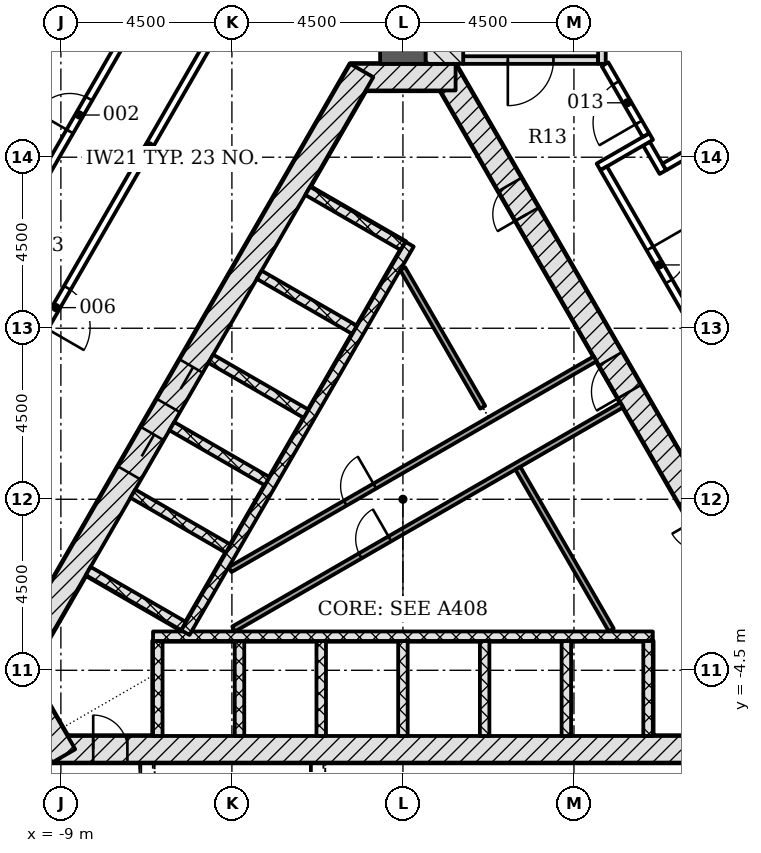
"""IFC4 building model, lengths in metres.
Left out: names, types, materials, properties, quantities, classifications, styles, units other than length and angle.
Written with IfcOpenShell. Run it as: python <this file> out.ifc"""

import sys

from ifc_helpers import new_model, si_unit, direction, frame, frame_2d, origin, place, context, subcontext, project, spatial, rectangle, extrude, element, fill, save


model = new_model("IFC4")
c1 = context("Model", 3, precision=1e-05, world=origin(), true_north=direction((0.0, 1.0)))
c2 = subcontext(c1, "Body", "Model", "MODEL_VIEW")
j1 = project(units=[si_unit("LENGTHUNIT", "METRE"), si_unit("PLANEANGLEUNIT", "RADIAN")], contexts=[c1])
p1 = place(None, origin())
s1 = spatial("IfcSite", under=j1, at=p1, CompositionType="ELEMENT")
p2 = place(p1, origin())
s2 = spatial("IfcBuilding", under=s1, at=p2, CompositionType="ELEMENT")
p3 = place(p2, frame((0.0, 0.0, 52.8)))
s3 = spatial("IfcBuildingStorey", under=s2, at=p3, CompositionType="ELEMENT", Elevation=52.8)
p4 = place(p3, frame((-9.229, -6.578, -0.3), z_axis=(0.0, 0.0, 1.0), x_axis=(1.0, 0.0, 0.0)))
e1 = element("IfcWall", 1, at=p4, inside=s3, PredefinedType="SHEAR", context=c2, shape_type="SweptSolid", body=[
    extrude(rectangle(XDim=18.458, YDim=0.7, at=frame_2d((9.229, 0.0))), origin(), (0.0, 0.0, 1.0), 5.5),
])
p5 = place(p4, frame((1.079, 0.0, 0.3)))
e2 = element("IfcOpeningElement", 2, at=p5, cuts=e1, PredefinedType="OPENING", context=c2, shape_type="SweptSolid", body=[
    extrude(rectangle(XDim=0.9, YDim=2.1, at=frame_2d((0.45, 1.05))), frame((0.0, 0.36, 0.0), z_axis=(0.0, -1.0, 0.0), x_axis=(1.0, 0.0, 0.0)), (0.0, 0.0, 1.0), 0.72),
])
p6 = place(p3, frame((10.311, -4.703, -0.3), z_axis=(0.0, 0.0, 1.0), x_axis=(-0.500001446645, 0.866024568562, 0.0)))
e3 = element("IfcWall", 3, at=p6, inside=s3, PredefinedType="SHEAR", context=c2, shape_type="SweptSolid", body=[
    extrude(rectangle(XDim=18.458, YDim=0.7, at=frame_2d((9.229, 0.0))), origin(), (0.0, 0.0, 1.0), 5.5),
])
p7 = place(p6, frame((8.7, 0.0, 0.3)))
e4 = element("IfcOpeningElement", 4, at=p7, cuts=e3, PredefinedType="OPENING", context=c2, shape_type="SweptSolid", body=[
    extrude(rectangle(XDim=1.0, YDim=2.1, at=frame_2d((0.5, 1.05))), frame((0.0, 0.36, 0.0), z_axis=(0.0, -1.0, 0.0), x_axis=(1.0, 0.0, 0.0)), (0.0, 0.0, 1.0), 0.72),
])
p8 = place(p6, frame((4.002, 0.0, 0.3)))
e5 = element("IfcOpeningElement", 5, at=p8, cuts=e3, PredefinedType="OPENING", context=c2, shape_type="SweptSolid", body=[
    extrude(rectangle(XDim=0.9, YDim=2.1, at=frame_2d((0.45, 1.05))), frame((0.0, 0.36, 0.0), z_axis=(0.0, -1.0, 0.0), x_axis=(1.0, 0.0, 0.0)), (0.0, 0.0, 1.0), 0.72),
])
p9 = place(p6, frame((14.093, 0.0, 0.3)))
e6 = element("IfcOpeningElement", 6, at=p9, cuts=e3, PredefinedType="OPENING", context=c2, shape_type="SweptSolid", body=[
    extrude(rectangle(XDim=0.9, YDim=2.1, at=frame_2d((0.45, 1.05))), frame((0.0, 0.36, 0.0), z_axis=(0.0, -1.0, 0.0), x_axis=(1.0, 0.0, 0.0)), (0.0, 0.0, 1.0), 0.72),
])
p10 = place(p3, frame((1.386, 11.106, -0.3), z_axis=(0.0, 0.0, 1.0), x_axis=(-1.0, 0.0, 0.0)))
e7 = element("IfcWall", 7, at=p10, inside=s3, PredefinedType="SHEAR", context=c2, shape_type="SweptSolid", body=[
    extrude(rectangle(XDim=2.771, YDim=0.7, at=frame_2d((1.386, 0.0))), origin(), (0.0, 0.0, 1.0), 5.5),
])
p11 = place(p3, frame((-1.083, 11.281, -0.3), z_axis=(0.0, 0.0, 1.0), x_axis=(-0.500001446645, -0.866024568562, 0.0)))
e8 = element("IfcWall", 8, at=p11, inside=s3, PredefinedType="SHEAR", context=c2, shape_type="SweptSolid", body=[
    extrude(rectangle(XDim=18.458, YDim=0.7, at=frame_2d((9.229, 0.0))), origin(), (0.0, 0.0, 1.0), 5.5),
])
p12 = place(p11, frame((8.979, 0.0, 0.3)))
e9 = element("IfcOpeningElement", 9, at=p12, cuts=e8, PredefinedType="OPENING", context=c2, shape_type="SweptSolid", body=[
    extrude(rectangle(XDim=1.2, YDim=2.1, at=frame_2d((0.6, 1.05))), frame((0.0, 0.36, 0.0), z_axis=(0.0, -1.0, 0.0), x_axis=(1.0, 0.0, 0.0)), (0.0, 0.0, 1.0), 0.72),
])
p13 = place(p11, frame((11.029, 0.0, 0.3)))
e10 = element("IfcOpeningElement", 10, at=p13, cuts=e8, PredefinedType="OPENING", context=c2, shape_type="SweptSolid", body=[
    extrude(rectangle(XDim=1.2, YDim=2.1, at=frame_2d((0.6, 1.05))), frame((0.0, 0.36, 0.0), z_axis=(0.0, -1.0, 0.0), x_axis=(1.0, 0.0, 0.0)), (0.0, 0.0, 1.0), 0.72),
])
p14 = place(p3, frame((-10.311, -4.353, -0.3), z_axis=(0.0, 0.0, 1.0), x_axis=(0.500042739161, -0.866000726912, 0.0)))
e11 = element("IfcWall", 11, at=p14, inside=s3, PredefinedType="SHEAR", context=c2, shape_type="SweptSolid", body=[
    extrude(rectangle(XDim=2.771, YDim=0.7, at=frame_2d((1.386, 0.0))), origin(), (0.0, 0.0, 1.0), 5.5),
])
p15 = place(p3, frame((0.0, 11.456, -0.3), z_axis=(0.0, 0.0, 1.0), x_axis=(0.0, 1.0, 0.0)))
e12 = element("IfcWall", 12, at=p15, inside=s3, PredefinedType="SHEAR", context=c2, shape_type="SweptSolid", body=[
    extrude(rectangle(XDim=13.699, YDim=1.2, at=frame_2d((6.849, 0.0))), origin(), (0.0, 0.0, 1.0), 5.5),
])
for number, where, z_axis, x_axis in (
    (13, (-6.45, -6.228, -0.3), (0.0, 0.0, 1.0), (0.0, 1.0, 0.0)),
    (14, (-4.3, -6.228, -0.3), (0.0, 0.0, 1.0), (0.0, 1.0, 0.0)),
    (15, (-2.15, -6.228, -0.3), (0.0, 0.0, 1.0), (0.0, 1.0, 0.0)),
    (16, (0.0, -6.228, -0.3), (0.0, 0.0, 1.0), (0.0, 1.0, 0.0)),
    (17, (2.15, -6.228, -0.3), (0.0, 0.0, 1.0), (0.0, 1.0, 0.0)),
    (18, (4.3, -6.228, -0.3), (0.0, 0.0, 1.0), (0.0, 1.0, 0.0)),
    (19, (6.45, -6.228, -0.3), (0.0, 0.0, 1.0), (0.0, 1.0, 0.0)),
):
    element("IfcWall", number, at=place(p3, frame(where, z_axis=z_axis, x_axis=x_axis)), inside=s3, PredefinedType="PARTITIONING", context=c2, shape_type="SweptSolid", body=[
        extrude(rectangle(XDim=2.5, YDim=0.25, at=frame_2d((1.25, 0.0))), origin(), (0.0, 0.0, 1.0), 5.5),
    ])
p16 = place(p3, frame((-6.575, -3.603, 0.0), z_axis=(0.0, 0.0, 1.0), x_axis=(1.0, 0.0, 0.0)))
e20 = element("IfcWall", 20, at=p16, inside=s3, PredefinedType="PARTITIONING", context=c2, shape_type="SweptSolid", body=[
    extrude(rectangle(XDim=13.15, YDim=0.25, at=frame_2d((6.575, 0.0))), origin(), (0.0, 0.0, 1.0), 5.2),
])
p17 = place(p3, frame((-2.506, 8.115, -0.3), z_axis=(0.0, 0.0, 1.0), x_axis=(0.865996321171, -0.50005036918, 0.0)))
e21 = element("IfcWall", 21, at=p17, inside=s3, PredefinedType="PARTITIONING", context=c2, shape_type="SweptSolid", body=[
    extrude(rectangle(XDim=2.9, YDim=0.25, at=frame_2d((1.45, 0.0))), origin(), (0.0, 0.0, 1.0), 5.5),
])
for number, where, z_axis, x_axis in (
    (22, (-3.781, 5.907, -0.3), (0.0, 0.0, 1.0), (0.866, -0.5, 0.0)),
    (23, (-5.056, 3.699, -0.3), (0.0, 0.0, 1.0), (0.866, -0.5, 0.0)),
    (24, (-6.081, 1.923, -0.3), (0.0, 0.0, 1.0), (0.866, -0.5, 0.0)),
    (25, (-7.106, 0.148, -0.3), (0.0, 0.0, 1.0), (0.866, -0.5, 0.0)),
    (26, (-8.281, -1.887, -0.3), (0.0, 0.0, 1.0), (0.866, -0.5, 0.0)),
):
    element("IfcWall", number, at=place(p3, frame(where, z_axis=z_axis, x_axis=x_axis)), inside=s3, PredefinedType="PARTITIONING", context=c2, shape_type="SweptSolid", body=[
        extrude(rectangle(XDim=2.9, YDim=0.25, at=frame_2d((1.45, 0.0))), origin(), (0.0, 0.0, 1.0), 5.5),
    ])
p18 = place(p3, frame((0.176, 6.711, 0.0), z_axis=(0.0, 0.0, 1.0), x_axis=(-0.500004227369, -0.866022963098, 0.0)))
e27 = element("IfcWall", 27, at=p18, inside=s3, PredefinedType="PARTITIONING", context=c2, shape_type="SweptSolid", body=[
    extrude(rectangle(XDim=11.8, YDim=0.25, at=frame_2d((5.9, 0.0))), origin(), (0.0, 0.0, 1.0), 5.2),
])
p19 = place(p3, frame((-4.548, -1.851, 0.0), z_axis=(0.0, 0.0, 1.0), x_axis=(0.866023939251, 0.500002536638, 0.0)))
e28 = element("IfcWall", 28, at=p19, inside=s3, PredefinedType="PARTITIONING", context=c2, shape_type="SweptSolid", body=[
    extrude(rectangle(XDim=11.092, YDim=0.15, at=frame_2d((5.546, 0.0))), origin(), (0.0, 0.0, 1.0), 5.2),
])
p20 = place(p19, frame((3.497, 0.0, 0.0)))
e29 = element("IfcOpeningElement", 29, at=p20, cuts=e28, PredefinedType="OPENING", context=c2, shape_type="SweptSolid", body=[
    extrude(rectangle(XDim=0.9, YDim=2.1, at=frame_2d((0.45, 1.05))), frame((0.0, 0.085, 0.0), z_axis=(0.0, -1.0, 0.0), x_axis=(1.0, 0.0, 0.0)), (0.0, 0.0, 1.0), 0.17),
])
p21 = place(p3, frame((2.099, 2.42, 0.0), z_axis=(0.0, 0.0, 1.0), x_axis=(-0.499998449073, 0.866026299211, 0.0)))
e30 = element("IfcWall", 30, at=p21, inside=s3, PredefinedType="PARTITIONING", context=c2, shape_type="SweptSolid", body=[
    extrude(rectangle(XDim=4.211, YDim=0.15, at=frame_2d((2.106, 0.0))), origin(), (0.0, 0.0, 1.0), 5.2),
])
p22 = place(p3, frame((-4.454, -3.413, 0.0), z_axis=(0.0, 0.0, 1.0), x_axis=(0.86603043987, 0.499991277142, 0.0)))
e31 = element("IfcWall", 31, at=p22, inside=s3, PredefinedType="PARTITIONING", context=c2, shape_type="SweptSolid", body=[
    extrude(rectangle(XDim=11.792, YDim=0.15, at=frame_2d((5.896, 0.0))), origin(), (0.0, 0.0, 1.0), 5.2),
])
p23 = place(p22, frame((3.847, 0.0, 0.0)))
e32 = element("IfcOpeningElement", 32, at=p23, cuts=e31, PredefinedType="OPENING", context=c2, shape_type="SweptSolid", body=[
    extrude(rectangle(XDim=0.9, YDim=2.1, at=frame_2d((0.45, 1.05))), frame((0.0, 0.085, 0.0), z_axis=(0.0, -1.0, 0.0), x_axis=(1.0, 0.0, 0.0)), (0.0, 0.0, 1.0), 0.17),
])
p24 = place(p3, frame((5.482, -3.439, 0.0), z_axis=(0.0, 0.0, 1.0), x_axis=(-0.500006183238, 0.866021833861, 0.0)))
e33 = element("IfcWall", 33, at=p24, inside=s3, PredefinedType="PARTITIONING", context=c2, shape_type="SweptSolid", body=[
    extrude(rectangle(XDim=4.916, YDim=0.15, at=frame_2d((2.458, 0.0))), origin(), (0.0, 0.0, 1.0), 5.2),
])
p25 = place(p3, frame((5.135, 11.556, -0.3), z_axis=(0.0, 0.0, 1.0), x_axis=(-1.0, 0.0, 0.0)))
e34 = element("IfcWall", 34, at=p25, inside=s3, PredefinedType="SHEAR", context=c2, shape_type="SweptSolid", body=[
    extrude(rectangle(XDim=3.55, YDim=0.2, at=frame_2d((1.775, 0.0))), origin(), (0.0, 0.0, 1.0), 5.5),
])
p26 = place(p25, frame((1.175, 0.0, 0.3)))
e35 = element("IfcOpeningElement", 35, at=p26, cuts=e34, PredefinedType="OPENING", context=c2, shape_type="SweptSolid", body=[
    extrude(rectangle(XDim=1.2, YDim=2.1, at=frame_2d((0.6, 1.05))), frame((0.0, 0.11, 0.0), z_axis=(0.0, -1.0, 0.0), x_axis=(1.0, 0.0, 0.0)), (0.0, 0.0, 1.0), 0.22),
])
p27 = place(p3, frame((5.236, 11.456, -0.3), z_axis=(0.0, 0.0, 1.0), x_axis=(0.0, 1.0, 0.0)))
e36 = element("IfcWall", 36, at=p27, inside=s3, PredefinedType="SHEAR", context=c2, shape_type="SweptSolid", body=[
    extrude(rectangle(XDim=5.6, YDim=0.2, at=frame_2d((2.8, 0.0))), origin(), (0.0, 0.0, 1.0), 5.5),
])
p28 = place(p27, frame((0.45, 0.0, 0.3)))
e37 = element("IfcOpeningElement", 37, at=p28, cuts=e36, PredefinedType="OPENING", context=c2, shape_type="SweptSolid", body=[
    extrude(rectangle(XDim=1.2, YDim=2.1, at=frame_2d((0.6, 1.05))), frame((0.0, 0.11, 0.0), z_axis=(0.0, -1.0, 0.0), x_axis=(1.0, 0.0, 0.0)), (0.0, 0.0, 1.0), 0.22),
])
p29 = place(p3, frame((1.093, 11.456, -0.3), z_axis=(0.0, 0.0, 1.0), x_axis=(0.0, 1.0, 0.0)))
e38 = element("IfcWall", 38, at=p29, inside=s3, PredefinedType="SHEAR", context=c2, shape_type="SweptSolid", body=[
    extrude(rectangle(XDim=7.2, YDim=0.986, at=frame_2d((3.6, 0.0))), origin(), (0.0, 0.0, 1.0), 5.5),
])
p30 = place(p3, frame((-0.687, 19.667, 0.0), z_axis=(0.0, 0.0, 1.0), x_axis=(-0.500000491645, -0.866025119933, 0.0)))
e39 = element("IfcWall", 39, at=p30, inside=s3, PredefinedType="PARTITIONING", context=c2, shape_type="SweptSolid", body=[
    extrude(rectangle(XDim=23.943, YDim=0.2, at=frame_2d((11.971, 0.0))), origin(), (0.0, 0.0, 1.0), 4.578),
])
p31 = place(p30, frame((16.287, 0.0, 0.0)))
e40 = element("IfcOpeningElement", 40, at=p31, cuts=e39, PredefinedType="OPENING", context=c2, shape_type="SweptSolid", body=[
    extrude(rectangle(XDim=1.2, YDim=2.1, at=frame_2d((0.6, 1.05))), frame((0.0, 0.11, 0.0), z_axis=(0.0, -1.0, 0.0), x_axis=(1.0, 0.0, 0.0)), (0.0, 0.0, 1.0), 0.22),
])
p32 = place(p3, frame((-16.104, -3.037, 0.0), z_axis=(0.0, 0.0, 1.0), x_axis=(0.500000029135, 0.866025386963, 0.0)))
e41 = element("IfcWall", 41, at=p32, inside=s3, PredefinedType="PARTITIONING", context=c2, shape_type="SweptSolid", body=[
    extrude(rectangle(XDim=30.835, YDim=0.2, at=frame_2d((15.417, 0.0))), origin(), (0.0, 0.0, 1.0), 4.578),
])
p33 = place(p32, frame((23.641, 0.0, 0.0)))
e42 = element("IfcOpeningElement", 42, at=p33, cuts=e41, PredefinedType="OPENING", context=c2, shape_type="SweptSolid", body=[
    extrude(rectangle(XDim=1.0, YDim=2.1, at=frame_2d((0.5, 1.05))), frame((0.0, 0.11, 0.0), z_axis=(0.0, -1.0, 0.0), x_axis=(1.0, 0.0, 0.0)), (0.0, 0.0, 1.0), 0.22),
])
p34 = place(p32, frame((14.681, 0.0, 0.0)))
e43 = element("IfcOpeningElement", 43, at=p34, cuts=e41, PredefinedType="OPENING", context=c2, shape_type="SweptSolid", body=[
    extrude(rectangle(XDim=1.0, YDim=2.1, at=frame_2d((0.5, 1.05))), frame((0.0, 0.11, 0.0), z_axis=(0.0, -1.0, 0.0), x_axis=(1.0, 0.0, 0.0)), (0.0, 0.0, 1.0), 0.22),
])
p35 = place(p32, frame((10.698, 0.0, 0.0)))
e44 = element("IfcOpeningElement", 44, at=p35, cuts=e41, PredefinedType="OPENING", context=c2, shape_type="SweptSolid", body=[
    extrude(rectangle(XDim=1.0, YDim=2.1, at=frame_2d((0.5, 1.05))), frame((0.0, 0.11, 0.0), z_axis=(0.0, -1.0, 0.0), x_axis=(1.0, 0.0, 0.0)), (0.0, 0.0, 1.0), 0.22),
])
p36 = place(p32, frame((6.51, 0.0, 0.0)))
e45 = element("IfcOpeningElement", 45, at=p36, cuts=e41, PredefinedType="OPENING", context=c2, shape_type="SweptSolid", body=[
    extrude(rectangle(XDim=1.0, YDim=2.1, at=frame_2d((0.5, 1.05))), frame((0.0, 0.11, 0.0), z_axis=(0.0, -1.0, 0.0), x_axis=(1.0, 0.0, 0.0)), (0.0, 0.0, 1.0), 0.22),
])
p37 = place(p32, frame((1.885, 0.0, 0.0)))
e46 = element("IfcOpeningElement", 46, at=p37, cuts=e41, PredefinedType="OPENING", context=c2, shape_type="SweptSolid", body=[
    extrude(rectangle(XDim=1.0, YDim=2.1, at=frame_2d((0.5, 1.05))), frame((0.0, 0.11, 0.0), z_axis=(0.0, -1.0, 0.0), x_axis=(1.0, 0.0, 0.0)), (0.0, 0.0, 1.0), 0.22),
])
p38 = place(p3, frame((6.408, 9.358, 0.0), z_axis=(0.0, 0.0, 1.0), x_axis=(0.49996696679, -0.866044474677, 0.0)))
e47 = element("IfcWall", 47, at=p38, inside=s3, PredefinedType="PARTITIONING", context=c2, shape_type="SweptSolid", body=[
    extrude(rectangle(XDim=0.864, YDim=0.2, at=frame_2d((0.432, 0.0))), origin(), (0.0, 0.0, 1.0), 5.2),
])
p39 = place(p3, frame((5.147, 8.745, 0.0), z_axis=(0.0, 0.0, 1.0), x_axis=(0.865987117328, 0.500066308224, 0.0)))
e48 = element("IfcWall", 48, at=p39, inside=s3, PredefinedType="PARTITIONING", context=c2, shape_type="SweptSolid", body=[
    extrude(rectangle(XDim=1.598, YDim=0.2, at=frame_2d((0.799, 0.0))), origin(), (0.0, 0.0, 1.0), 5.2),
])
p40 = place(p3, frame((6.395, 9.581, 0.0), z_axis=(0.0, 0.0, 1.0), x_axis=(-0.500003735859, 0.866023246874, 0.0)))
e49 = element("IfcWall", 49, at=p40, inside=s3, PredefinedType="PARTITIONING", context=c2, shape_type="SweptSolid", body=[
    extrude(rectangle(XDim=2.154, YDim=0.2, at=frame_2d((1.077, 0.0))), origin(), (0.0, 0.0, 1.0), 4.578),
])
p41 = place(p40, frame((0.383, 0.0, 0.0)))
e50 = element("IfcOpeningElement", 50, at=p41, cuts=e49, PredefinedType="OPENING", context=c2, shape_type="SweptSolid", body=[
    extrude(rectangle(XDim=1.2, YDim=2.1, at=frame_2d((0.6, 1.05))), frame((0.0, 0.11, 0.0), z_axis=(0.0, -1.0, 0.0), x_axis=(1.0, 0.0, 0.0)), (0.0, 0.0, 1.0), 0.22),
])
p42 = place(p3, frame((5.282, 8.708, 0.0), z_axis=(0.0, 0.0, 1.0), x_axis=(0.500007704848, -0.866020955343, 0.0)))
e51 = element("IfcWall", 51, at=p42, inside=s3, PredefinedType="PARTITIONING", context=c2, shape_type="SweptSolid", body=[
    extrude(rectangle(XDim=18.991, YDim=0.2, at=frame_2d((9.496, 0.0))), origin(), (0.0, 0.0, 1.0), 4.578),
])
p43 = place(p42, frame((14.779, 0.0, 0.0)))
e52 = element("IfcOpeningElement", 52, at=p43, cuts=e51, PredefinedType="OPENING", context=c2, shape_type="SweptSolid", body=[
    extrude(rectangle(XDim=1.0, YDim=2.1, at=frame_2d((0.5, 1.05))), frame((0.0, 0.11, 0.0), z_axis=(0.0, -1.0, 0.0), x_axis=(1.0, 0.0, 0.0)), (0.0, 0.0, 1.0), 0.22),
])
p44 = place(p42, frame((8.83, 0.0, 0.0)))
e53 = element("IfcOpeningElement", 53, at=p44, cuts=e51, PredefinedType="OPENING", context=c2, shape_type="SweptSolid", body=[
    extrude(rectangle(XDim=1.0, YDim=2.1, at=frame_2d((0.5, 1.05))), frame((0.0, 0.11, 0.0), z_axis=(0.0, -1.0, 0.0), x_axis=(1.0, 0.0, 0.0)), (0.0, 0.0, 1.0), 0.22),
])
p45 = place(p42, frame((2.435, 0.0, 0.0)))
e54 = element("IfcOpeningElement", 54, at=p45, cuts=e51, PredefinedType="OPENING", context=c2, shape_type="SweptSolid", body=[
    extrude(rectangle(XDim=1.0, YDim=2.1, at=frame_2d((0.5, 1.05))), frame((0.0, 0.11, 0.0), z_axis=(0.0, -1.0, 0.0), x_axis=(1.0, 0.0, 0.0)), (0.0, 0.0, 1.0), 0.22),
])
p46 = place(p3, frame((6.878, 8.744, 0.0), z_axis=(0.0, 0.0, 1.0), x_axis=(0.866023983177, 0.500002460556, 0.0)))
e55 = element("IfcWall", 55, at=p46, inside=s3, PredefinedType="PARTITIONING", context=c2, shape_type="SweptSolid", body=[
    extrude(rectangle(XDim=3.12, YDim=0.2, at=frame_2d((1.56, 0.0))), origin(), (0.0, 0.0, 1.0), 5.2),
])
p47 = place(p3, frame((6.566, 15.327, 0.0), z_axis=(0.0, 0.0, 1.0), x_axis=(0.499997778408, -0.866026686418, 0.0)))
e56 = element("IfcWall", 56, at=p47, inside=s3, PredefinedType="PARTITIONING", context=c2, shape_type="SweptSolid", body=[
    extrude(rectangle(XDim=5.757, YDim=0.2, at=frame_2d((2.878, 0.0))), origin(), (0.0, 0.0, 1.0), 4.578),
])
p48 = place(p12, origin())
e57 = element("IfcDoor", 57, at=p48, inside=s3, OperationType="DOUBLE_DOOR_SLIDING", PredefinedType="DOOR", context=c2, shape_type="SweptSolid", body=[
    extrude(rectangle(XDim=1.2, YDim=2.1, at=frame_2d((0.6, 1.05))), frame((0.0, 0.025, 0.0), z_axis=(0.0, -1.0, 0.0), x_axis=(1.0, 0.0, 0.0)), (0.0, 0.0, 1.0), 0.05),
])
fill(e9, e57)
p49 = place(p13, origin())
e58 = element("IfcDoor", 58, at=p49, inside=s3, OperationType="DOUBLE_DOOR_SLIDING", PredefinedType="DOOR", context=c2, shape_type="SweptSolid", body=[
    extrude(rectangle(XDim=1.2, YDim=2.1, at=frame_2d((0.6, 1.05))), frame((0.0, 0.025, 0.0), z_axis=(0.0, -1.0, 0.0), x_axis=(1.0, 0.0, 0.0)), (0.0, 0.0, 1.0), 0.05),
])
fill(e10, e58)
p50 = place(p7, origin())
e59 = element("IfcDoor", 59, at=p50, inside=s3, OperationType="SINGLE_SWING_LEFT", PredefinedType="DOOR", context=c2, shape_type="SweptSolid", body=[
    extrude(rectangle(XDim=1.0, YDim=2.1, at=frame_2d((0.5, 1.05))), frame((0.0, 0.075, 0.0), z_axis=(0.0, -1.0, 0.0), x_axis=(1.0, 0.0, 0.0)), (0.0, 0.0, 1.0), 0.15),
])
fill(e4, e59)
p51 = place(p9, origin())
e60 = element("IfcDoor", 60, at=p51, inside=s3, OperationType="SINGLE_SWING_LEFT", PredefinedType="DOOR", context=c2, shape_type="SweptSolid", body=[
    extrude(rectangle(XDim=0.9, YDim=2.1, at=frame_2d((0.45, 1.05))), frame((0.0, 0.075, 0.0), z_axis=(0.0, -1.0, 0.0), x_axis=(1.0, 0.0, 0.0)), (0.0, 0.0, 1.0), 0.15),
])
fill(e6, e60)
p52 = place(p23, origin())
e61 = element("IfcDoor", 61, at=p52, inside=s3, OperationType="SINGLE_SWING_RIGHT", PredefinedType="DOOR", context=c2, shape_type="SweptSolid", body=[
    extrude(rectangle(XDim=0.9, YDim=2.1, at=frame_2d((0.45, 1.05))), frame((0.0, 0.025, 0.0), z_axis=(0.0, -1.0, 0.0), x_axis=(1.0, 0.0, 0.0)), (0.0, 0.0, 1.0), 0.05),
])
fill(e32, e61)
p53 = place(p5, origin())
e62 = element("IfcDoor", 62, at=p53, inside=s3, OperationType="SINGLE_SWING_LEFT", PredefinedType="DOOR", context=c2, shape_type="SweptSolid", body=[
    extrude(rectangle(XDim=0.9, YDim=2.1, at=frame_2d((0.45, 1.05))), frame((0.0, 0.075, 0.0), z_axis=(0.0, -1.0, 0.0), x_axis=(1.0, 0.0, 0.0)), (0.0, 0.0, 1.0), 0.15),
])
fill(e2, e62)
p54 = place(p20, origin())
e63 = element("IfcDoor", 63, at=p54, inside=s3, OperationType="SINGLE_SWING_RIGHT", PredefinedType="DOOR", context=c2, shape_type="SweptSolid", body=[
    extrude(rectangle(XDim=0.9, YDim=2.1, at=frame_2d((0.45, 1.05))), frame((0.0, 0.025, 0.0), z_axis=(0.0, -1.0, 0.0), x_axis=(1.0, 0.0, 0.0)), (0.0, 0.0, 1.0), 0.05),
])
fill(e29, e63)
p55 = place(p26, origin())
e64 = element("IfcDoor", 64, at=p55, inside=s3, OperationType="SINGLE_SWING_RIGHT", PredefinedType="DOOR", context=c2, shape_type="SweptSolid", body=[
    extrude(rectangle(XDim=1.2, YDim=2.1, at=frame_2d((0.6, 1.05))), frame((0.0, 0.025, 0.0), z_axis=(0.0, -1.0, 0.0), x_axis=(1.0, 0.0, 0.0)), (0.0, 0.0, 1.0), 0.05),
])
fill(e35, e64)
p56 = place(p34, origin())
e65 = element("IfcDoor", 65, at=p56, inside=s3, OperationType="SINGLE_SWING_LEFT", PredefinedType="DOOR", context=c2, shape_type="SweptSolid", body=[
    extrude(rectangle(XDim=1.0, YDim=2.1, at=frame_2d((0.5, 1.05))), frame((0.0, 0.025, 0.0), z_axis=(0.0, -1.0, 0.0), x_axis=(1.0, 0.0, 0.0)), (0.0, 0.0, 1.0), 0.05),
])
fill(e43, e65)
p57 = place(p31, origin())
e66 = element("IfcDoor", 66, at=p57, inside=s3, OperationType="SINGLE_SWING_RIGHT", PredefinedType="DOOR", context=c2, shape_type="SweptSolid", body=[
    extrude(rectangle(XDim=1.2, YDim=2.1, at=frame_2d((0.6, 1.05))), frame((0.0, 0.025, 0.0), z_axis=(0.0, -1.0, 0.0), x_axis=(1.0, 0.0, 0.0)), (0.0, 0.0, 1.0), 0.05),
])
fill(e40, e66)
p58 = place(p45, origin())
e67 = element("IfcDoor", 67, at=p58, inside=s3, OperationType="SINGLE_SWING_LEFT", PredefinedType="DOOR", context=c2, shape_type="SweptSolid", body=[
    extrude(rectangle(XDim=1.0, YDim=2.1, at=frame_2d((0.5, 1.05))), frame((0.0, 0.025, 0.0), z_axis=(0.0, -1.0, 0.0), x_axis=(1.0, 0.0, 0.0)), (0.0, 0.0, 1.0), 0.05),
])
fill(e54, e67)
p59 = place(p41, origin())
e68 = element("IfcDoor", 68, at=p59, inside=s3, OperationType="SINGLE_SWING_LEFT", PredefinedType="DOOR", context=c2, shape_type="SweptSolid", body=[
    extrude(rectangle(XDim=1.2, YDim=2.1, at=frame_2d((0.6, 1.05))), frame((0.0, 0.025, 0.0), z_axis=(0.0, -1.0, 0.0), x_axis=(1.0, 0.0, 0.0)), (0.0, 0.0, 1.0), 0.05),
])
fill(e50, e68)
save(model, sys.argv[1])
